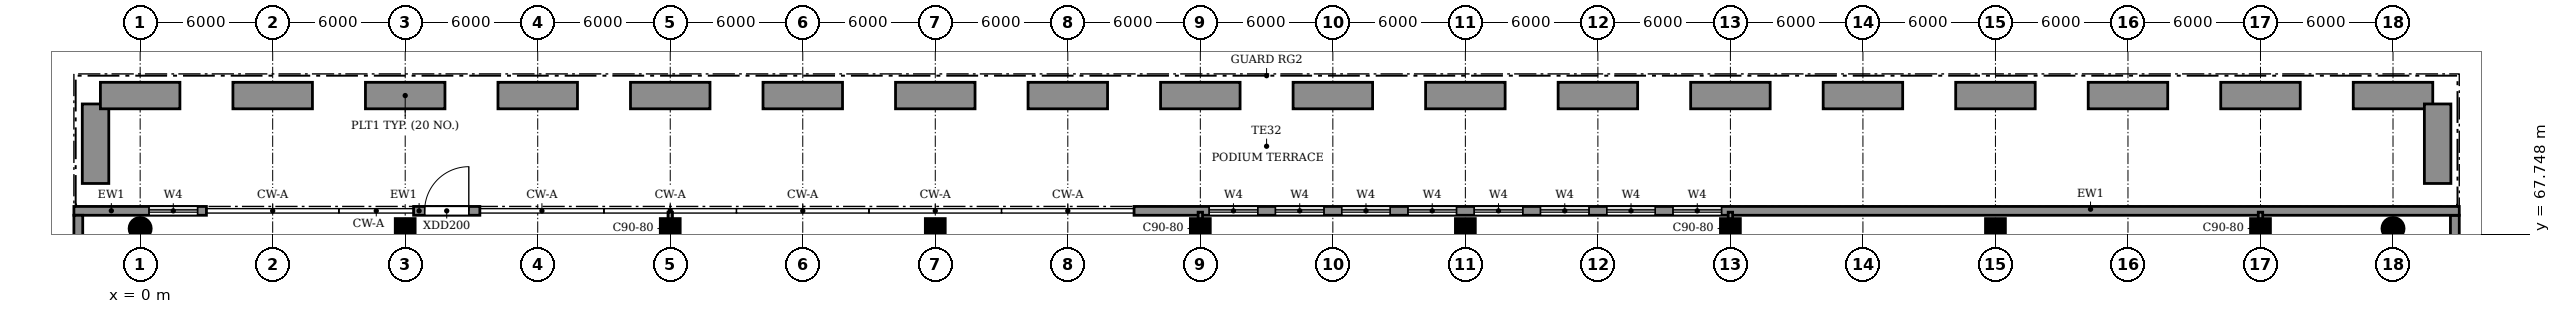
"""IFC4 building model, lengths in metres.
Left out: names, types, materials, properties, quantities, classifications, styles, units other than length and angle.
Written with IfcOpenShell. Run it as: python <this file> out.ifc"""

import sys

from ifc_helpers import new_model, si_unit, direction, frame, frame_2d, origin, origin_2d, place, context, subcontext, project, spatial, polyline, rectangle, circle, outline, extrude, source, transform, mapped, element, fill, save


model = new_model("IFC4")
c1 = context("Model", 3, precision=1e-05, world=origin(), true_north=direction((0.0, 1.0)))
c2 = subcontext(c1, "Body", "Model", "MODEL_VIEW")
j1 = project(units=[si_unit("LENGTHUNIT", "METRE"), si_unit("PLANEANGLEUNIT", "RADIAN")], contexts=[c1])
p1 = place(None, origin())
s1 = spatial("IfcSite", under=j1, at=p1, CompositionType="ELEMENT")
p2 = place(p1, origin())
s2 = spatial("IfcBuilding", under=s1, at=p2, CompositionType="ELEMENT")
p3 = place(p2, frame((0.0, 0.0, 6.0)))
s3 = spatial("IfcBuildingStorey", under=s2, at=p3, CompositionType="ELEMENT", Elevation=6.0)
m1 = source(origin(), c2, "Body", "SweptSolid", [
    extrude(circle(Radius=0.5, at=origin_2d()), origin(), (0.0, 0.0, 1.0), 4.52),
])
p4 = place(p3, frame((0.0, 68.0, 0.0), z_axis=(0.0, 0.0, 1.0), x_axis=(1.0, 0.0, 0.0)))
e1 = element("IfcColumn", 1, at=p4, inside=s3, PredefinedType="COLUMN", context=c2, shape_type="MappedRepresentation", body=[
    mapped(m1, transform((0.0, 0.0, 0.0))),
])
m2 = source(origin(), c2, "Body", "SweptSolid", [
    extrude(rectangle(XDim=0.9, YDim=0.9, at=origin_2d()), origin(), (0.0, 0.0, 1.0), 4.52),
])
for number, where, z_axis, x_axis in (
    (2, (12.0, 68.0, 0.0), (0.0, 0.0, 1.0), (1.0, 0.0, 0.0)),
    (3, (24.0, 68.0, 0.0), (0.0, 0.0, 1.0), (1.0, 0.0, 0.0)),
    (4, (36.0, 68.0, 0.0), (0.0, 0.0, 1.0), (1.0, 0.0, 0.0)),
    (5, (48.0, 68.0, 0.0), (0.0, 0.0, 1.0), (1.0, 0.0, 0.0)),
    (6, (60.0, 68.0, 0.0), (0.0, 0.0, 1.0), (1.0, 0.0, 0.0)),
    (7, (72.0, 68.0, 0.0), (0.0, 0.0, 1.0), (1.0, 0.0, 0.0)),
    (8, (84.0, 68.0, 0.0), (0.0, 0.0, 1.0), (1.0, 0.0, 0.0)),
    (9, (96.0, 68.0, 0.0), (0.0, 0.0, 1.0), (1.0, 0.0, 0.0)),
):
    element("IfcColumn", number, at=place(p3, frame(where, z_axis=z_axis, x_axis=x_axis)), inside=s3, PredefinedType="COLUMN", context=c2, shape_type="MappedRepresentation", body=[
        mapped(m2, transform((0.0, 0.0, 0.0))),
    ])
p5 = place(p3, frame((102.0, 68.0, 0.0), z_axis=(0.0, 0.0, 1.0), x_axis=(1.0, 0.0, 0.0)))
e10 = element("IfcColumn", 10, at=p5, inside=s3, PredefinedType="COLUMN", context=c2, shape_type="MappedRepresentation", body=[
    mapped(m1, transform((0.0, 0.0, 0.0))),
])
p6 = place(p3, frame((104.8, 0.2, 0.0), z_axis=(0.0, 0.0, 1.0), x_axis=(0.0, 1.0, 0.0)))
e11 = element("IfcWall", 11, at=p6, inside=s3, PredefinedType="STANDARD", context=c2, shape_type="SweptSolid", body=[
    extrude(rectangle(XDim=68.4, YDim=0.4, at=frame_2d((34.2, 0.0))), origin(), (0.0, 0.0, 1.0), 4.52),
])
p7 = place(p3, frame((105.0, 68.8, 0.0), z_axis=(0.0, 0.0, 1.0), x_axis=(-1.0, 0.0, 0.0)))
e12 = element("IfcWall", 12, at=p7, inside=s3, PredefinedType="STANDARD", context=c2, shape_type="SweptSolid", body=[
    extrude(rectangle(XDim=60.0, YDim=0.4, at=frame_2d((30.0, 0.0))), origin(), (0.0, 0.0, 1.0), 4.52),
])
p8 = place(p7, frame((54.4, 0.0, 0.9)))
e13 = element("IfcOpeningElement", 13, at=p8, cuts=e12, PredefinedType="OPENING", context=c2, shape_type="SweptSolid", body=[
    extrude(rectangle(XDim=2.2, YDim=2.7, at=frame_2d((1.1, 1.35))), frame((0.0, 0.21, 0.0), z_axis=(0.0, -1.0, 0.0), x_axis=(1.0, 0.0, 0.0)), (0.0, 0.0, 1.0), 0.42),
])
p9 = place(p7, frame((51.4, 0.0, 0.9)))
e14 = element("IfcOpeningElement", 14, at=p9, cuts=e12, PredefinedType="OPENING", context=c2, shape_type="SweptSolid", body=[
    extrude(rectangle(XDim=2.2, YDim=2.7, at=frame_2d((1.1, 1.35))), frame((0.0, 0.21, 0.0), z_axis=(0.0, -1.0, 0.0), x_axis=(1.0, 0.0, 0.0)), (0.0, 0.0, 1.0), 0.42),
])
p10 = place(p7, frame((48.4, 0.0, 0.9)))
e15 = element("IfcOpeningElement", 15, at=p10, cuts=e12, PredefinedType="OPENING", context=c2, shape_type="SweptSolid", body=[
    extrude(rectangle(XDim=2.2, YDim=2.7, at=frame_2d((1.1, 1.35))), frame((0.0, 0.21, 0.0), z_axis=(0.0, -1.0, 0.0), x_axis=(1.0, 0.0, 0.0)), (0.0, 0.0, 1.0), 0.42),
])
p11 = place(p7, frame((45.4, 0.0, 0.9)))
e16 = element("IfcOpeningElement", 16, at=p11, cuts=e12, PredefinedType="OPENING", context=c2, shape_type="SweptSolid", body=[
    extrude(rectangle(XDim=2.2, YDim=2.7, at=frame_2d((1.1, 1.35))), frame((0.0, 0.21, 0.0), z_axis=(0.0, -1.0, 0.0), x_axis=(1.0, 0.0, 0.0)), (0.0, 0.0, 1.0), 0.42),
])
p12 = place(p7, frame((42.4, 0.0, 0.9)))
e17 = element("IfcOpeningElement", 17, at=p12, cuts=e12, PredefinedType="OPENING", context=c2, shape_type="SweptSolid", body=[
    extrude(rectangle(XDim=2.2, YDim=2.7, at=frame_2d((1.1, 1.35))), frame((0.0, 0.21, 0.0), z_axis=(0.0, -1.0, 0.0), x_axis=(1.0, 0.0, 0.0)), (0.0, 0.0, 1.0), 0.42),
])
p13 = place(p7, frame((39.4, 0.0, 0.9)))
e18 = element("IfcOpeningElement", 18, at=p13, cuts=e12, PredefinedType="OPENING", context=c2, shape_type="SweptSolid", body=[
    extrude(rectangle(XDim=2.2, YDim=2.7, at=frame_2d((1.1, 1.35))), frame((0.0, 0.21, 0.0), z_axis=(0.0, -1.0, 0.0), x_axis=(1.0, 0.0, 0.0)), (0.0, 0.0, 1.0), 0.42),
])
p14 = place(p7, frame((36.4, 0.0, 0.9)))
e19 = element("IfcOpeningElement", 19, at=p14, cuts=e12, PredefinedType="OPENING", context=c2, shape_type="SweptSolid", body=[
    extrude(rectangle(XDim=2.2, YDim=2.7, at=frame_2d((1.1, 1.35))), frame((0.0, 0.21, 0.0), z_axis=(0.0, -1.0, 0.0), x_axis=(1.0, 0.0, 0.0)), (0.0, 0.0, 1.0), 0.42),
])
p15 = place(p7, frame((33.4, 0.0, 0.9)))
e20 = element("IfcOpeningElement", 20, at=p15, cuts=e12, PredefinedType="OPENING", context=c2, shape_type="SweptSolid", body=[
    extrude(rectangle(XDim=2.2, YDim=2.7, at=frame_2d((1.1, 1.35))), frame((0.0, 0.21, 0.0), z_axis=(0.0, -1.0, 0.0), x_axis=(1.0, 0.0, 0.0)), (0.0, 0.0, 1.0), 0.42),
])
p16 = place(p3, frame((15.38, 68.8, 0.0), z_axis=(0.0, 0.0, 1.0), x_axis=(-1.0, 0.0, 0.0)))
e21 = element("IfcWall", 21, at=p16, inside=s3, PredefinedType="STANDARD", context=c2, shape_type="SweptSolid", body=[
    extrude(rectangle(XDim=3.0, YDim=0.4, at=frame_2d((1.5, 0.0))), origin(), (0.0, 0.0, 1.0), 4.52),
])
p17 = place(p16, frame((0.5, 0.0, 0.0)))
e22 = element("IfcOpeningElement", 22, at=p17, cuts=e21, PredefinedType="OPENING", context=c2, shape_type="SweptSolid", body=[
    extrude(rectangle(XDim=2.0, YDim=2.4, at=frame_2d((1.0, 1.2))), frame((0.0, 0.21, 0.0), z_axis=(0.0, -1.0, 0.0), x_axis=(1.0, 0.0, 0.0)), (0.0, 0.0, 1.0), 0.42),
])
p18 = place(p3, frame((3.0, 68.8, 0.0), z_axis=(0.0, 0.0, 1.0), x_axis=(-1.0, 0.0, 0.0)))
e23 = element("IfcWall", 23, at=p18, inside=s3, PredefinedType="STANDARD", context=c2, shape_type="SweptSolid", body=[
    extrude(rectangle(XDim=6.0, YDim=0.4, at=frame_2d((3.0, 0.0))), origin(), (0.0, 0.0, 1.0), 4.52),
])
p19 = place(p18, frame((0.4, 0.0, 0.9)))
e24 = element("IfcOpeningElement", 24, at=p19, cuts=e23, PredefinedType="OPENING", context=c2, shape_type="SweptSolid", body=[
    extrude(rectangle(XDim=2.2, YDim=2.7, at=frame_2d((1.1, 1.35))), frame((0.0, 0.21, 0.0), z_axis=(0.0, -1.0, 0.0), x_axis=(1.0, 0.0, 0.0)), (0.0, 0.0, 1.0), 0.42),
])
p20 = place(p3, frame((-2.8, 68.6, 0.0), z_axis=(0.0, 0.0, 1.0), x_axis=(0.0, -1.0, 0.0)))
e25 = element("IfcWall", 25, at=p20, inside=s3, PredefinedType="STANDARD", context=c2, shape_type="SweptSolid", body=[
    extrude(rectangle(XDim=68.4, YDim=0.4, at=frame_2d((34.2, 0.0))), origin(), (0.0, 0.0, 1.0), 4.52),
])
m3 = source(origin(), c2, "Body", "SweptSolid", [
    extrude(outline(polyline([(0.0, 0.0), (1.2, 0.0), (1.2, 3.6), (0.0, 3.6), (0.0, 0.0)])), origin(), (0.0, 0.0, 1.0), 0.6),
])
p21 = place(p3, frame((-2.62, 70.04, 0.0)))
e26 = element("IfcWall", 26, at=p21, inside=s3, PredefinedType="USERDEFINED", context=c2, shape_type="MappedRepresentation", body=[
    mapped(m3, transform((0.0, 0.0, 0.0))),
])
m4 = source(origin(), c2, "Body", "SweptSolid", [
    extrude(outline(polyline([(0.0, 0.0), (3.6, 0.0), (3.6, 1.2), (0.0, 1.2), (0.0, 0.0)])), origin(), (0.0, 0.0, 1.0), 0.6),
])
for number, where in (
    (27, (-1.8, 73.42, 0.0)),
    (28, (4.2, 73.42, 0.0)),
    (29, (10.2, 73.42, 0.0)),
    (30, (16.2, 73.42, 0.0)),
    (31, (22.2, 73.42, 0.0)),
    (32, (28.2, 73.42, 0.0)),
    (33, (34.2, 73.42, 0.0)),
    (34, (40.2, 73.42, 0.0)),
    (35, (46.2, 73.42, 0.0)),
    (36, (52.2, 73.42, 0.0)),
    (37, (58.2, 73.42, 0.0)),
    (38, (64.2, 73.42, 0.0)),
    (39, (70.2, 73.42, 0.0)),
    (40, (76.2, 73.42, 0.0)),
    (41, (82.2, 73.42, 0.0)),
    (42, (88.2, 73.42, 0.0)),
    (43, (94.2, 73.42, 0.0)),
    (44, (100.2, 73.42, 0.0)),
):
    element("IfcWall", number, at=place(p3, frame(where)), inside=s3, PredefinedType="USERDEFINED", context=c2, shape_type="MappedRepresentation", body=[
        mapped(m4, transform((0.0, 0.0, 0.0))),
    ])
p22 = place(p3, frame((103.42, 70.04, 0.0)))
e45 = element("IfcWall", 45, at=p22, inside=s3, PredefinedType="USERDEFINED", context=c2, shape_type="MappedRepresentation", body=[
    mapped(m3, transform((0.0, 0.0, 0.0))),
])
for number, where, z_axis, x_axis in (
    (46, (24.0, 44.9, 0.0), (0.0, 0.0, 1.0), (0.0, 1.0, 0.0)),
    (47, (48.0, 44.9, 0.0), (0.0, 0.0, 1.0), (0.0, 1.0, 0.0)),
    (48, (72.0, 44.9, 0.0), (0.0, 0.0, 1.0), (0.0, 1.0, 0.0)),
    (49, (96.0, 44.9, 0.0), (0.0, 0.0, 1.0), (0.0, 1.0, 0.0)),
):
    element("IfcWall", number, at=place(p3, frame(where, z_axis=z_axis, x_axis=x_axis)), inside=s3, PredefinedType="PARTITIONING", context=c2, shape_type="SweptSolid", body=[
        extrude(rectangle(XDim=23.84, YDim=0.2, at=frame_2d((11.92, 0.0))), origin(), (0.0, 0.0, 1.0), 4.52),
    ])
p23 = place(p8, origin())
e50 = element("IfcWindow", 50, at=p23, inside=s3, PartitioningType="DOUBLE_PANEL_HORIZONTAL", PredefinedType="WINDOW", context=c2, shape_type="SweptSolid", body=[
    extrude(rectangle(XDim=2.2, YDim=2.7, at=frame_2d((1.1, 1.35))), frame((0.0, 0.03, 0.0), z_axis=(0.0, -1.0, 0.0), x_axis=(1.0, 0.0, 0.0)), (0.0, 0.0, 1.0), 0.06),
])
fill(e13, e50)
p24 = place(p9, origin())
e51 = element("IfcWindow", 51, at=p24, inside=s3, PartitioningType="DOUBLE_PANEL_HORIZONTAL", PredefinedType="WINDOW", context=c2, shape_type="SweptSolid", body=[
    extrude(rectangle(XDim=2.2, YDim=2.7, at=frame_2d((1.1, 1.35))), frame((0.0, 0.03, 0.0), z_axis=(0.0, -1.0, 0.0), x_axis=(1.0, 0.0, 0.0)), (0.0, 0.0, 1.0), 0.06),
])
fill(e14, e51)
p25 = place(p10, origin())
e52 = element("IfcWindow", 52, at=p25, inside=s3, PartitioningType="DOUBLE_PANEL_HORIZONTAL", PredefinedType="WINDOW", context=c2, shape_type="SweptSolid", body=[
    extrude(rectangle(XDim=2.2, YDim=2.7, at=frame_2d((1.1, 1.35))), frame((0.0, 0.03, 0.0), z_axis=(0.0, -1.0, 0.0), x_axis=(1.0, 0.0, 0.0)), (0.0, 0.0, 1.0), 0.06),
])
fill(e15, e52)
p26 = place(p11, origin())
e53 = element("IfcWindow", 53, at=p26, inside=s3, PartitioningType="DOUBLE_PANEL_HORIZONTAL", PredefinedType="WINDOW", context=c2, shape_type="SweptSolid", body=[
    extrude(rectangle(XDim=2.2, YDim=2.7, at=frame_2d((1.1, 1.35))), frame((0.0, 0.03, 0.0), z_axis=(0.0, -1.0, 0.0), x_axis=(1.0, 0.0, 0.0)), (0.0, 0.0, 1.0), 0.06),
])
fill(e16, e53)
p27 = place(p12, origin())
e54 = element("IfcWindow", 54, at=p27, inside=s3, PartitioningType="DOUBLE_PANEL_HORIZONTAL", PredefinedType="WINDOW", context=c2, shape_type="SweptSolid", body=[
    extrude(rectangle(XDim=2.2, YDim=2.7, at=frame_2d((1.1, 1.35))), frame((0.0, 0.03, 0.0), z_axis=(0.0, -1.0, 0.0), x_axis=(1.0, 0.0, 0.0)), (0.0, 0.0, 1.0), 0.06),
])
fill(e17, e54)
p28 = place(p13, origin())
e55 = element("IfcWindow", 55, at=p28, inside=s3, PartitioningType="DOUBLE_PANEL_HORIZONTAL", PredefinedType="WINDOW", context=c2, shape_type="SweptSolid", body=[
    extrude(rectangle(XDim=2.2, YDim=2.7, at=frame_2d((1.1, 1.35))), frame((0.0, 0.03, 0.0), z_axis=(0.0, -1.0, 0.0), x_axis=(1.0, 0.0, 0.0)), (0.0, 0.0, 1.0), 0.06),
])
fill(e18, e55)
p29 = place(p14, origin())
e56 = element("IfcWindow", 56, at=p29, inside=s3, PartitioningType="DOUBLE_PANEL_HORIZONTAL", PredefinedType="WINDOW", context=c2, shape_type="SweptSolid", body=[
    extrude(rectangle(XDim=2.2, YDim=2.7, at=frame_2d((1.1, 1.35))), frame((0.0, 0.03, 0.0), z_axis=(0.0, -1.0, 0.0), x_axis=(1.0, 0.0, 0.0)), (0.0, 0.0, 1.0), 0.06),
])
fill(e19, e56)
p30 = place(p15, origin())
e57 = element("IfcWindow", 57, at=p30, inside=s3, PartitioningType="DOUBLE_PANEL_HORIZONTAL", PredefinedType="WINDOW", context=c2, shape_type="SweptSolid", body=[
    extrude(rectangle(XDim=2.2, YDim=2.7, at=frame_2d((1.1, 1.35))), frame((0.0, 0.03, 0.0), z_axis=(0.0, -1.0, 0.0), x_axis=(1.0, 0.0, 0.0)), (0.0, 0.0, 1.0), 0.06),
])
fill(e20, e57)
p31 = place(p19, origin())
e58 = element("IfcWindow", 58, at=p31, inside=s3, PartitioningType="DOUBLE_PANEL_HORIZONTAL", PredefinedType="WINDOW", context=c2, shape_type="SweptSolid", body=[
    extrude(rectangle(XDim=2.2, YDim=2.7, at=frame_2d((1.1, 1.35))), frame((0.0, 0.03, 0.0), z_axis=(0.0, -1.0, 0.0), x_axis=(1.0, 0.0, 0.0)), (0.0, 0.0, 1.0), 0.06),
])
fill(e24, e58)
p32 = place(p17, frame((2.0, 0.0, 0.0), z_axis=(0.0, 0.0, 1.0), x_axis=(-1.0, 0.0, 0.0)))
e59 = element("IfcDoor", 59, at=p32, inside=s3, OperationType="DOUBLE_DOOR_SINGLE_SWING", PredefinedType="DOOR", context=c2, shape_type="SweptSolid", body=[
    extrude(rectangle(XDim=2.0, YDim=2.4, at=frame_2d((1.0, 1.2))), frame((0.0, 0.025, 0.0), z_axis=(0.0, -1.0, 0.0), x_axis=(1.0, 0.0, 0.0)), (0.0, 0.0, 1.0), 0.05),
])
fill(e22, e59)
save(model, sys.argv[1])
